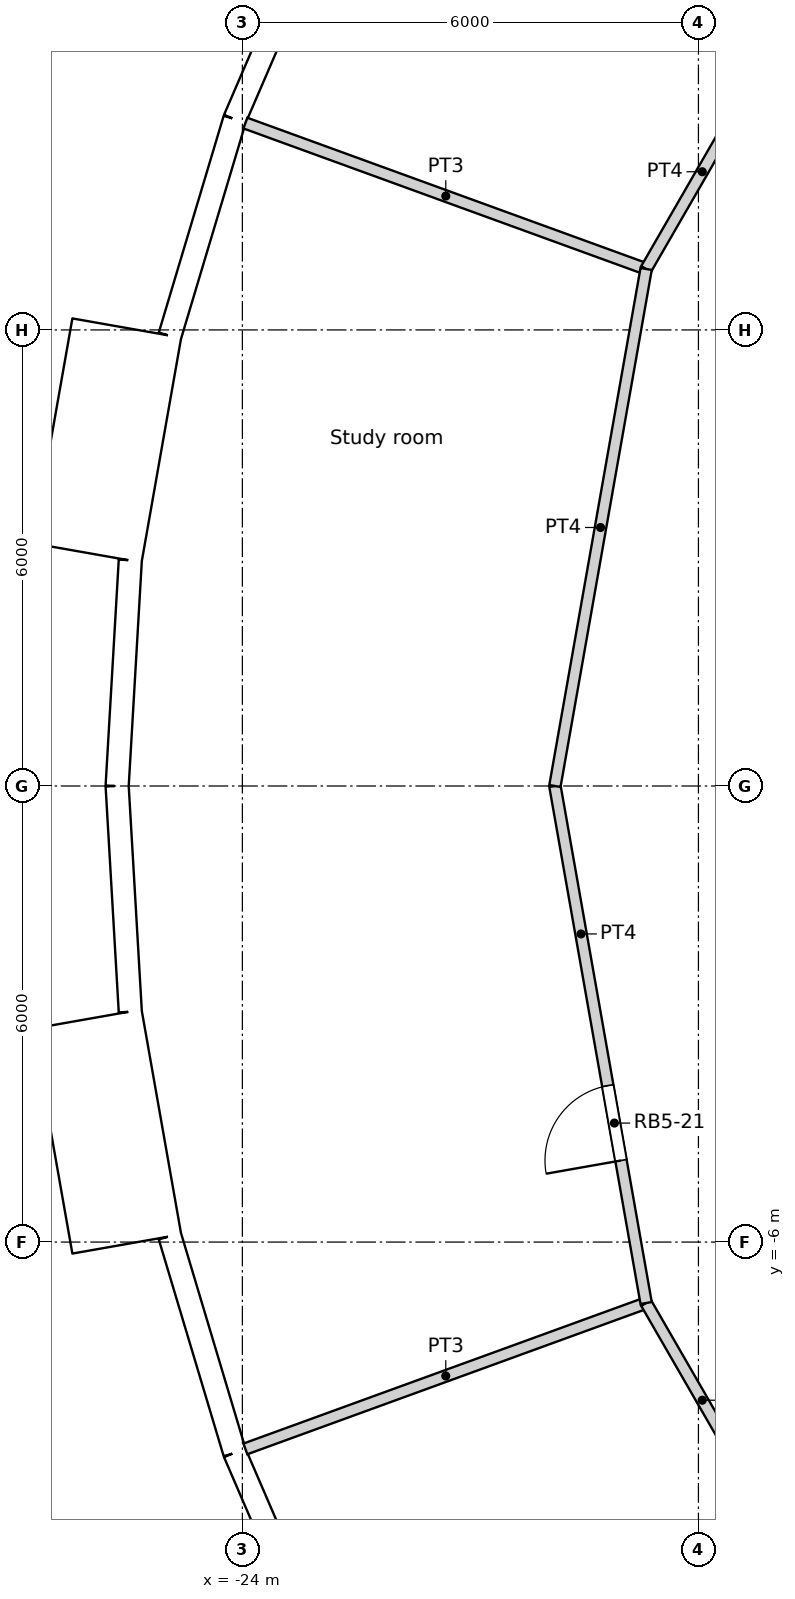
"""IFC4 building model, lengths in metres.
Left out: names, types, materials, properties, quantities, classifications, styles, units other than length and angle.
Written with IfcOpenShell. Run it as: python <this file> out.ifc"""

import sys

from ifc_helpers import new_model, si_unit, direction, frame, frame_2d, origin, origin_2d, place, context, subcontext, project, spatial, rectangle, circle, extrude, element, fill, save


model = new_model("IFC4")
c1 = context("Model", 3, precision=1e-05, world=origin(), true_north=direction((0.0, 1.0)))
c2 = subcontext(c1, "Body", "Model", "MODEL_VIEW")
j1 = project(units=[si_unit("LENGTHUNIT", "METRE"), si_unit("PLANEANGLEUNIT", "RADIAN")], contexts=[c1])
p1 = place(None, origin())
s1 = spatial("IfcSite", under=j1, at=p1, CompositionType="ELEMENT")
p2 = place(p1, origin())
s2 = spatial("IfcBuilding", under=s1, at=p2, CompositionType="ELEMENT")
p3 = place(p2, frame((0.0, 0.0, 169.2)))
s3 = spatial("IfcBuildingStorey", under=s2, at=p3, CompositionType="ELEMENT", Elevation=169.2)
for number, where, z_axis, x_axis in (
    (1, (-23.067, 8.396, 0.0), (0.0, 0.0, 1.0), (1.0, 0.0, 0.0)),
    (2, (-24.382, 2.85, 0.0), (0.0, 0.0, 1.0), (1.0, 0.0, 0.0)),
    (3, (-24.382, -2.85, 0.0), (0.0, 0.0, 1.0), (1.0, 0.0, 0.0)),
    (4, (-23.067, -8.396, 0.0), (0.0, 0.0, 1.0), (1.0, 0.0, 0.0)),
):
    element("IfcColumn", number, at=place(p3, frame(where, z_axis=z_axis, x_axis=x_axis)), inside=s3, PredefinedType="COLUMN", context=c2, shape_type="SweptSolid", body=[
        extrude(circle(Radius=0.6, at=origin_2d()), origin(), (0.0, 0.0, 1.0), 3.6),
    ])
for number, where, z_axis, x_axis in (
    (5, (-18.612, 2.805, 0.0), (0.0, 0.0, 1.0), (1.0, 0.0, 0.0)),
    (6, (-18.612, -2.805, 0.0), (0.0, 0.0, 1.0), (1.0, 0.0, 0.0)),
):
    element("IfcColumn", number, at=place(p3, frame(where, z_axis=z_axis, x_axis=x_axis)), inside=s3, PredefinedType="COLUMN", context=c2, shape_type="SweptSolid", body=[
        extrude(circle(Radius=0.65, at=origin_2d()), origin(), (0.0, 0.0, 1.0), 3.6),
    ])
p4 = place(p3, frame((-22.923, 11.502, 0.0), z_axis=(0.0, 0.0, 1.0), x_axis=(-0.396148129016, -0.918186614952, 0.0)))
e7 = element("IfcWall", 7, at=p4, inside=s3, PredefinedType="SOLIDWALL", context=c2, shape_type="SweptSolid", body=[
    extrude(rectangle(XDim=2.973, YDim=0.3, at=frame_2d((1.486, 0.0))), origin(), (0.0, 0.0, 1.0), 3.3),
])
p5 = place(p4, frame((1.486, 0.0, 1.55)))
e8 = element("IfcOpeningElement", 8, at=p5, cuts=e7, PredefinedType="OPENING", context=c2, shape_type="SweptSolid", body=[
    extrude(circle(Radius=0.9, at=origin_2d()), frame((0.0, 0.16, 0.0), z_axis=(0.0, -1.0, 0.0), x_axis=(1.0, 0.0, 0.0)), (0.0, 0.0, 1.0), 0.32),
])
p6 = place(p3, frame((-24.101, 8.772, 0.0), z_axis=(0.0, 0.0, 1.0), x_axis=(-0.286782750849, -0.957995643944, 0.0)))
e9 = element("IfcWall", 9, at=p6, inside=s3, PredefinedType="SOLIDWALL", context=c2, shape_type="SweptSolid", body=[
    extrude(rectangle(XDim=2.973, YDim=0.3, at=frame_2d((1.486, 0.0))), origin(), (0.0, 0.0, 1.0), 3.3),
])
p7 = place(p6, frame((1.486, 0.0, 1.55)))
e10 = element("IfcOpeningElement", 10, at=p7, cuts=e9, PredefinedType="OPENING", context=c2, shape_type="SweptSolid", body=[
    extrude(circle(Radius=0.9, at=origin_2d()), frame((0.0, 0.16, 0.0), z_axis=(0.0, -1.0, 0.0), x_axis=(1.0, 0.0, 0.0)), (0.0, 0.0, 1.0), 0.32),
])
p8 = place(p3, frame((-25.521, 6.023, -0.3), z_axis=(0.0, 0.0, 1.0), x_axis=(-0.173669267716, -0.984804034035, 0.0)))
e11 = element("IfcWall", 11, at=p8, inside=s3, PredefinedType="ELEMENTEDWALL", context=c2, shape_type="SweptSolid", body=[
    extrude(rectangle(XDim=3.0, YDim=1.45, at=frame_2d((1.5, 0.0))), origin(), (0.0, 0.0, 1.0), 3.6),
])
p9 = place(p8, frame((1.5, 0.0, 1.85)))
e12 = element("IfcOpeningElement", 12, at=p9, cuts=e11, PredefinedType="OPENING", context=c2, shape_type="SweptSolid", body=[
    extrude(circle(Radius=0.9, at=origin_2d()), frame((0.0, 0.735, 0.0), z_axis=(0.0, -1.0, 0.0), x_axis=(1.0, 0.0, 0.0)), (0.0, 0.0, 1.0), 1.47),
])
p10 = place(p3, frame((-25.475, 2.968, 0.0), z_axis=(0.0, 0.0, 1.0), x_axis=(-0.058144307138, -0.998308188661, 0.0)))
e13 = element("IfcWall", 13, at=p10, inside=s3, PredefinedType="SOLIDWALL", context=c2, shape_type="SweptSolid", body=[
    extrude(rectangle(XDim=2.973, YDim=0.3, at=frame_2d((1.486, 0.0))), origin(), (0.0, 0.0, 1.0), 3.3),
])
p11 = place(p10, frame((1.486, 0.0, 1.55)))
e14 = element("IfcOpeningElement", 14, at=p11, cuts=e13, PredefinedType="OPENING", context=c2, shape_type="SweptSolid", body=[
    extrude(circle(Radius=0.9, at=origin_2d()), frame((0.0, 0.16, 0.0), z_axis=(0.0, -1.0, 0.0), x_axis=(1.0, 0.0, 0.0)), (0.0, 0.0, 1.0), 0.32),
])
p12 = place(p3, frame((-25.647, 0.0, 0.0), z_axis=(0.0, 0.0, 1.0), x_axis=(0.058144307138, -0.998308188661, 0.0)))
e15 = element("IfcWall", 15, at=p12, inside=s3, PredefinedType="SOLIDWALL", context=c2, shape_type="SweptSolid", body=[
    extrude(rectangle(XDim=2.973, YDim=0.3, at=frame_2d((1.486, 0.0))), origin(), (0.0, 0.0, 1.0), 3.3),
])
p13 = place(p12, frame((1.486, 0.0, 1.55)))
e16 = element("IfcOpeningElement", 16, at=p13, cuts=e15, PredefinedType="OPENING", context=c2, shape_type="SweptSolid", body=[
    extrude(circle(Radius=0.9, at=origin_2d()), frame((0.0, 0.16, 0.0), z_axis=(0.0, -1.0, 0.0), x_axis=(1.0, 0.0, 0.0)), (0.0, 0.0, 1.0), 0.32),
])
p14 = place(p3, frame((-26.042, -3.069, -0.3), z_axis=(0.0, 0.0, 1.0), x_axis=(0.173669267716, -0.984804034035, 0.0)))
e17 = element("IfcWall", 17, at=p14, inside=s3, PredefinedType="ELEMENTEDWALL", context=c2, shape_type="SweptSolid", body=[
    extrude(rectangle(XDim=3.0, YDim=1.45, at=frame_2d((1.5, 0.0))), origin(), (0.0, 0.0, 1.0), 3.6),
])
p15 = place(p14, frame((1.5, 0.0, 1.85)))
e18 = element("IfcOpeningElement", 18, at=p15, cuts=e17, PredefinedType="OPENING", context=c2, shape_type="SweptSolid", body=[
    extrude(circle(Radius=0.9, at=origin_2d()), frame((0.0, 0.735, 0.0), z_axis=(0.0, -1.0, 0.0), x_axis=(1.0, 0.0, 0.0)), (0.0, 0.0, 1.0), 1.47),
])
p16 = place(p3, frame((-24.953, -5.924, 0.0), z_axis=(0.0, 0.0, 1.0), x_axis=(0.286782750849, -0.957995643944, 0.0)))
e19 = element("IfcWall", 19, at=p16, inside=s3, PredefinedType="SOLIDWALL", context=c2, shape_type="SweptSolid", body=[
    extrude(rectangle(XDim=2.973, YDim=0.3, at=frame_2d((1.486, 0.0))), origin(), (0.0, 0.0, 1.0), 3.3),
])
p17 = place(p16, frame((1.486, 0.0, 1.55)))
e20 = element("IfcOpeningElement", 20, at=p17, cuts=e19, PredefinedType="OPENING", context=c2, shape_type="SweptSolid", body=[
    extrude(circle(Radius=0.9, at=origin_2d()), frame((0.0, 0.16, 0.0), z_axis=(0.0, -1.0, 0.0), x_axis=(1.0, 0.0, 0.0)), (0.0, 0.0, 1.0), 0.32),
])
p18 = place(p3, frame((-24.101, -8.772, 0.0), z_axis=(0.0, 0.0, 1.0), x_axis=(0.396148129016, -0.918186614952, 0.0)))
e21 = element("IfcWall", 21, at=p18, inside=s3, PredefinedType="SOLIDWALL", context=c2, shape_type="SweptSolid", body=[
    extrude(rectangle(XDim=2.973, YDim=0.3, at=frame_2d((1.486, 0.0))), origin(), (0.0, 0.0, 1.0), 3.3),
])
p19 = place(p18, frame((1.486, 0.0, 1.55)))
e22 = element("IfcOpeningElement", 22, at=p19, cuts=e21, PredefinedType="OPENING", context=c2, shape_type="SweptSolid", body=[
    extrude(circle(Radius=0.9, at=origin_2d()), frame((0.0, 0.16, 0.0), z_axis=(0.0, -1.0, 0.0), x_axis=(1.0, 0.0, 0.0)), (0.0, 0.0, 1.0), 0.32),
])
p20 = place(p3, frame((-18.688, 6.802, 0.0), z_axis=(0.0, 0.0, 1.0), x_axis=(0.499914202267, 0.866074933462, 0.0)))
e23 = element("IfcWall", 23, at=p20, inside=s3, PredefinedType="PARTITIONING", context=c2, shape_type="SweptSolid", body=[
    extrude(rectangle(XDim=6.907, YDim=0.15, at=frame_2d((3.454, 0.0))), origin(), (0.0, 0.0, 1.0), 3.3),
])
p21 = place(p20, frame((3.004, 0.0, 0.0)))
e24 = element("IfcOpeningElement", 24, at=p21, cuts=e23, PredefinedType="OPENING", context=c2, shape_type="SweptSolid", body=[
    extrude(rectangle(XDim=1.0, YDim=2.04, at=frame_2d((0.5, 1.02))), frame((0.0, 0.075, 0.0), z_axis=(0.0, -1.0, 0.0), x_axis=(1.0, 0.0, 0.0)), (0.0, 0.0, 1.0), 0.15),
])
p22 = place(p3, frame((-19.888, 0.0, 0.0), z_axis=(0.0, 0.0, 1.0), x_axis=(0.173728873845, -0.98479352069, 0.0)))
e25 = element("IfcWall", 25, at=p22, inside=s3, PredefinedType="PARTITIONING", context=c2, shape_type="SweptSolid", body=[
    extrude(rectangle(XDim=6.907, YDim=0.15, at=frame_2d((3.454, 0.0))), origin(), (0.0, 0.0, 1.0), 3.3),
])
p23 = place(p22, frame((4.003, 0.0, 0.0)))
e26 = element("IfcOpeningElement", 26, at=p23, cuts=e25, PredefinedType="OPENING", context=c2, shape_type="SweptSolid", body=[
    extrude(rectangle(XDim=1.0, YDim=2.04, at=frame_2d((0.5, 1.02))), frame((0.0, 0.075, 0.0), z_axis=(0.0, -1.0, 0.0), x_axis=(1.0, 0.0, 0.0)), (0.0, 0.0, 1.0), 0.15),
])
p24 = place(p3, frame((-19.888, 0.0, 0.0), z_axis=(0.0, 0.0, 1.0), x_axis=(0.173728873845, 0.98479352069, 0.0)))
e27 = element("IfcWall", 27, at=p24, inside=s3, PredefinedType="PARTITIONING", context=c2, shape_type="SweptSolid", body=[
    extrude(rectangle(XDim=6.907, YDim=0.15, at=frame_2d((3.454, 0.0))), origin(), (0.0, 0.0, 1.0), 3.3),
])
p25 = place(p3, frame((-18.688, -6.802, 0.0), z_axis=(0.0, 0.0, 1.0), x_axis=(0.499914202267, -0.866074933462, 0.0)))
e28 = element("IfcWall", 28, at=p25, inside=s3, PredefinedType="PARTITIONING", context=c2, shape_type="SweptSolid", body=[
    extrude(rectangle(XDim=6.907, YDim=0.15, at=frame_2d((3.454, 0.0))), origin(), (0.0, 0.0, 1.0), 3.3),
])
p26 = place(p25, frame((3.003, 0.0, 0.0)))
e29 = element("IfcOpeningElement", 29, at=p26, cuts=e28, PredefinedType="OPENING", context=c2, shape_type="SweptSolid", body=[
    extrude(rectangle(XDim=1.0, YDim=2.04, at=frame_2d((0.5, 1.02))), frame((0.0, 0.075, 0.0), z_axis=(0.0, -1.0, 0.0), x_axis=(1.0, 0.0, 0.0)), (0.0, 0.0, 1.0), 0.15),
])
for number, where, z_axis, x_axis in (
    (30, (-23.96, 8.721, 0.0), (0.0, 0.0, 1.0), (0.94, -0.342, 0.0)),
    (31, (-23.96, -8.721, 0.0), (0.0, 0.0, 1.0), (0.94, 0.342, 0.0)),
):
    element("IfcWall", number, at=place(p3, frame(where, z_axis=z_axis, x_axis=x_axis)), inside=s3, PredefinedType="PARTITIONING", context=c2, shape_type="SweptSolid", body=[
        extrude(rectangle(XDim=5.61, YDim=0.15, at=frame_2d((2.805, 0.0))), origin(), (0.0, 0.0, 1.0), 3.3),
    ])
p27 = place(p5, origin())
e32 = element("IfcWindow", 32, at=p27, inside=s3, PartitioningType="SINGLE_PANEL", PredefinedType="WINDOW", context=c2, shape_type="SweptSolid", body=[
    extrude(circle(Radius=0.9, at=origin_2d()), frame((0.0, 0.12, 0.0), z_axis=(0.0, -1.0, 0.0), x_axis=(1.0, 0.0, 0.0)), (0.0, 0.0, 1.0), 0.1),
])
fill(e8, e32)
p28 = place(p7, origin())
e33 = element("IfcWindow", 33, at=p28, inside=s3, PartitioningType="SINGLE_PANEL", PredefinedType="WINDOW", context=c2, shape_type="SweptSolid", body=[
    extrude(circle(Radius=0.9, at=origin_2d()), frame((0.0, 0.12, 0.0), z_axis=(0.0, -1.0, 0.0), x_axis=(1.0, 0.0, 0.0)), (0.0, 0.0, 1.0), 0.1),
])
fill(e10, e33)
p29 = place(p9, origin())
e34 = element("IfcWindow", 34, at=p29, inside=s3, PartitioningType="SINGLE_PANEL", PredefinedType="WINDOW", context=c2, shape_type="SweptSolid", body=[
    extrude(circle(Radius=0.9, at=origin_2d()), frame((0.0, 0.695, 0.0), z_axis=(0.0, -1.0, 0.0), x_axis=(1.0, 0.0, 0.0)), (0.0, 0.0, 1.0), 0.1),
])
fill(e12, e34)
p30 = place(p11, origin())
e35 = element("IfcWindow", 35, at=p30, inside=s3, PartitioningType="SINGLE_PANEL", PredefinedType="WINDOW", context=c2, shape_type="SweptSolid", body=[
    extrude(circle(Radius=0.9, at=origin_2d()), frame((0.0, 0.12, 0.0), z_axis=(0.0, -1.0, 0.0), x_axis=(1.0, 0.0, 0.0)), (0.0, 0.0, 1.0), 0.1),
])
fill(e14, e35)
p31 = place(p13, origin())
e36 = element("IfcWindow", 36, at=p31, inside=s3, PartitioningType="SINGLE_PANEL", PredefinedType="WINDOW", context=c2, shape_type="SweptSolid", body=[
    extrude(circle(Radius=0.9, at=origin_2d()), frame((0.0, 0.12, 0.0), z_axis=(0.0, -1.0, 0.0), x_axis=(1.0, 0.0, 0.0)), (0.0, 0.0, 1.0), 0.1),
])
fill(e16, e36)
p32 = place(p15, origin())
e37 = element("IfcWindow", 37, at=p32, inside=s3, PartitioningType="SINGLE_PANEL", PredefinedType="WINDOW", context=c2, shape_type="SweptSolid", body=[
    extrude(circle(Radius=0.9, at=origin_2d()), frame((0.0, 0.695, 0.0), z_axis=(0.0, -1.0, 0.0), x_axis=(1.0, 0.0, 0.0)), (0.0, 0.0, 1.0), 0.1),
])
fill(e18, e37)
p33 = place(p17, origin())
e38 = element("IfcWindow", 38, at=p33, inside=s3, PartitioningType="SINGLE_PANEL", PredefinedType="WINDOW", context=c2, shape_type="SweptSolid", body=[
    extrude(circle(Radius=0.9, at=origin_2d()), frame((0.0, 0.12, 0.0), z_axis=(0.0, -1.0, 0.0), x_axis=(1.0, 0.0, 0.0)), (0.0, 0.0, 1.0), 0.1),
])
fill(e20, e38)
p34 = place(p19, origin())
e39 = element("IfcWindow", 39, at=p34, inside=s3, PartitioningType="SINGLE_PANEL", PredefinedType="WINDOW", context=c2, shape_type="SweptSolid", body=[
    extrude(circle(Radius=0.9, at=origin_2d()), frame((0.0, 0.12, 0.0), z_axis=(0.0, -1.0, 0.0), x_axis=(1.0, 0.0, 0.0)), (0.0, 0.0, 1.0), 0.1),
])
fill(e22, e39)
p35 = place(p23, origin())
e40 = element("IfcDoor", 40, at=p35, inside=s3, OperationType="SINGLE_SWING_LEFT", PredefinedType="DOOR", context=c2, shape_type="SweptSolid", body=[
    extrude(rectangle(XDim=1.0, YDim=2.04, at=frame_2d((0.5, 1.02))), frame((0.0, 0.025, 0.0), z_axis=(0.0, -1.0, 0.0), x_axis=(1.0, 0.0, 0.0)), (0.0, 0.0, 1.0), 0.05),
])
fill(e26, e40)
save(model, sys.argv[1])
